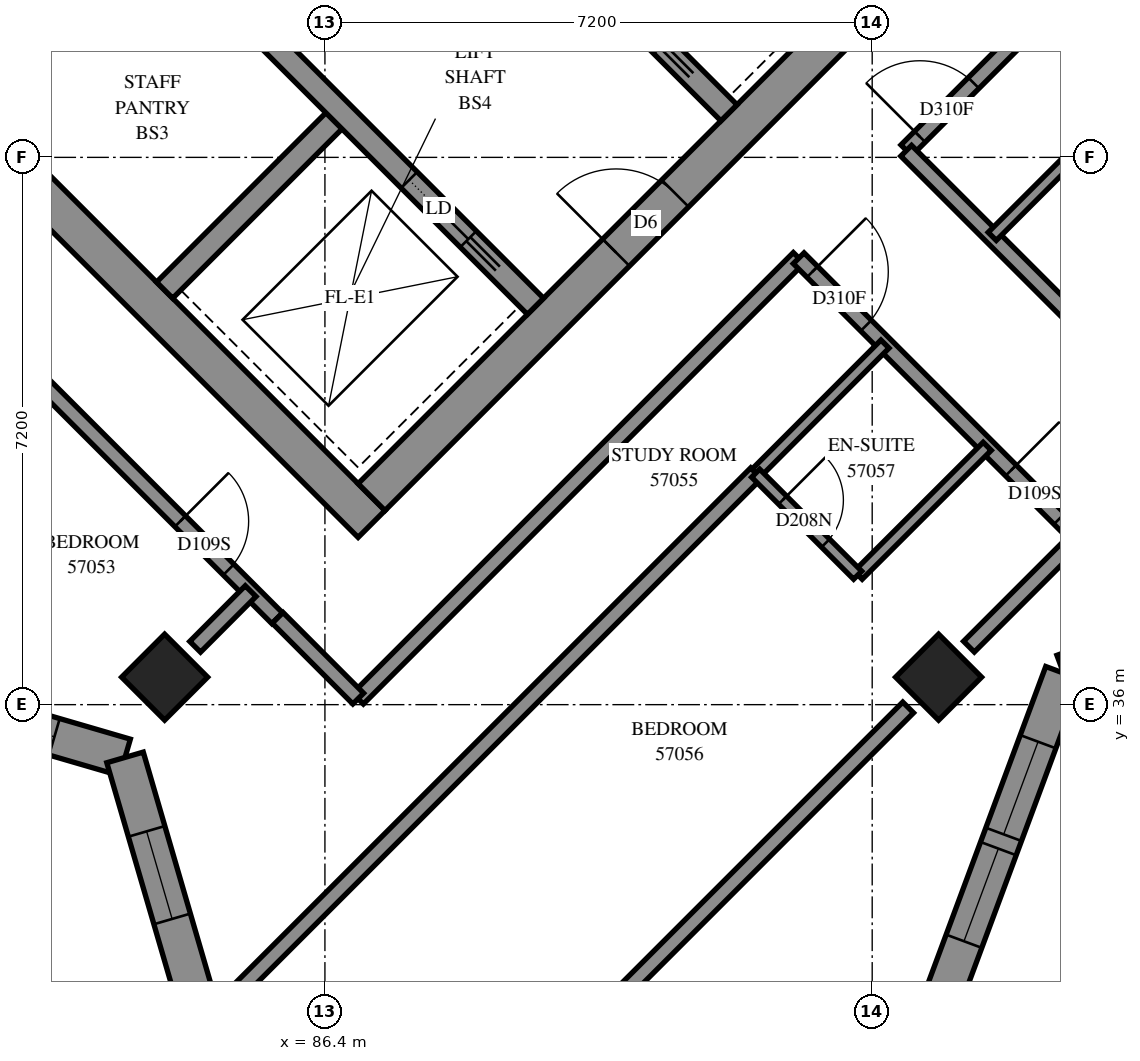
"""IFC4 building model, lengths in metres.
Left out: names, types, materials, properties, quantities, classifications, styles, units other than length and angle.
Written with IfcOpenShell. Run it as: python <this file> out.ifc"""

import sys

from ifc_helpers import new_model, si_unit, direction, frame, frame_2d, origin, origin_2d, place, context, subcontext, project, spatial, polyline, rectangle, outline, extrude, element, fill, save


model = new_model("IFC4")
c1 = context("Model", 3, precision=1e-05, world=origin(), true_north=direction((0.0, 1.0)))
c2 = subcontext(c1, "Body", "Model", "MODEL_VIEW")
j1 = project(units=[si_unit("LENGTHUNIT", "METRE"), si_unit("PLANEANGLEUNIT", "RADIAN")], contexts=[c1])
p1 = place(None, origin())
s1 = spatial("IfcSite", under=j1, at=p1, CompositionType="ELEMENT")
p2 = place(p1, origin())
s2 = spatial("IfcBuilding", under=s1, at=p2, CompositionType="ELEMENT")
p3 = place(p2, frame((0.0, 0.0, 210.0)))
s3 = spatial("IfcBuildingStorey", under=s2, at=p3, CompositionType="ELEMENT", Elevation=210.0)
for number, where, z_axis, x_axis in (
    (1, (84.291, 36.362, 0.0), (0.0, 0.0, 1.0), (0.707, -0.707, 0.0)),
    (2, (94.474, 36.362, 0.0), (0.0, 0.0, 1.0), (0.707, -0.707, 0.0)),
):
    element("IfcColumn", number, at=place(p3, frame(where, z_axis=z_axis, x_axis=x_axis)), inside=s3, PredefinedType="COLUMN", context=c2, shape_type="SweptSolid", body=[
        extrude(rectangle(XDim=0.8, YDim=0.8, at=origin_2d()), origin(), (0.0, 0.0, 1.0), 3.1),
    ])
p4 = place(p3, frame((76.124, 49.267, -0.3), z_axis=(0.0, 0.0, 1.0), x_axis=(0.7071067812, -0.7071067812, 0.0)))
e3 = element("IfcWall", 3, at=p4, inside=s3, PredefinedType="SHEAR", context=c2, shape_type="SweptSolid", body=[
    extrude(rectangle(XDim=15.4, YDim=0.5, at=frame_2d((7.7, 0.0))), origin(), (0.0, 0.0, 1.0), 2.7),
])
p5 = place(p3, frame((87.013, 38.731, -0.3), z_axis=(0.0, 0.0, 1.0), x_axis=(0.7071067812, 0.7071067812, 0.0)))
e4 = element("IfcWall", 4, at=p5, inside=s3, PredefinedType="SHEAR", context=c2, shape_type="SweptSolid", body=[
    extrude(rectangle(XDim=14.4, YDim=0.5, at=frame_2d((7.2, 0.0))), origin(), (0.0, 0.0, 1.0), 2.7),
])
p6 = place(p5, frame((4.55, 0.0, 0.3)))
e5 = element("IfcOpeningElement", 5, at=p6, cuts=e4, PredefinedType="OPENING", context=c2, shape_type="SweptSolid", body=[
    extrude(rectangle(XDim=1.1, YDim=2.1, at=frame_2d((0.55, 1.05))), frame((0.0, 0.26, 0.0), z_axis=(0.0, -1.0, 0.0), x_axis=(1.0, 0.0, 0.0)), (0.0, 0.0, 1.0), 0.52),
])
p7 = place(p5, frame((11.35, 0.0, 0.3)))
e6 = element("IfcOpeningElement", 6, at=p7, cuts=e4, PredefinedType="OPENING", context=c2, shape_type="SweptSolid", body=[
    extrude(rectangle(XDim=1.1, YDim=2.1, at=frame_2d((0.55, 1.05))), frame((0.0, 0.26, 0.0), z_axis=(0.0, -1.0, 0.0), x_axis=(1.0, 0.0, 0.0)), (0.0, 0.0, 1.0), 0.52),
])
for number, where, z_axis, x_axis in (
    (7, (81.746, 43.999, 0.0), (0.0, 0.0, 1.0), (0.707, 0.707, 0.0)),
    (8, (84.291, 41.453, 0.0), (0.0, 0.0, 1.0), (0.707, 0.707, 0.0)),
):
    element("IfcWall", number, at=place(p3, frame(where, z_axis=z_axis, x_axis=x_axis)), inside=s3, PredefinedType="SOLIDWALL", context=c2, shape_type="SweptSolid", body=[
        extrude(rectangle(XDim=3.3, YDim=0.3, at=frame_2d((1.65, 0.0))), origin(), (0.0, 0.0, 1.0), 3.1),
    ])
p8 = place(p3, frame((78.988, 51.423, 0.0), z_axis=(0.0, 0.0, 1.0), x_axis=(0.7071067812, -0.7071067812, 0.0)))
e9 = element("IfcWall", 9, at=p8, inside=s3, PredefinedType="SOLIDWALL", context=c2, shape_type="SweptSolid", body=[
    extrude(rectangle(XDim=14.4, YDim=0.3, at=frame_2d((7.2, 0.0))), origin(), (0.0, 0.0, 1.0), 3.1),
])
p9 = place(p8, frame((1.35, 0.0, 0.0)))
e10 = element("IfcOpeningElement", 10, at=p9, cuts=e9, PredefinedType="OPENING", context=c2, shape_type="SweptSolid", body=[
    extrude(rectangle(XDim=0.9, YDim=2.1, at=frame_2d((0.45, 1.05))), frame((0.0, 0.16, 0.0), z_axis=(0.0, -1.0, 0.0), x_axis=(1.0, 0.0, 0.0)), (0.0, 0.0, 1.0), 0.32),
])
p10 = place(p8, frame((4.95, 0.0, 0.0)))
e11 = element("IfcOpeningElement", 11, at=p10, cuts=e9, PredefinedType="OPENING", context=c2, shape_type="SweptSolid", body=[
    extrude(rectangle(XDim=0.9, YDim=2.1, at=frame_2d((0.45, 1.05))), frame((0.0, 0.16, 0.0), z_axis=(0.0, -1.0, 0.0), x_axis=(1.0, 0.0, 0.0)), (0.0, 0.0, 1.0), 0.32),
])
p11 = place(p8, frame((8.55, 0.0, 0.0)))
e12 = element("IfcOpeningElement", 12, at=p11, cuts=e9, PredefinedType="OPENING", context=c2, shape_type="SweptSolid", body=[
    extrude(rectangle(XDim=0.9, YDim=2.1, at=frame_2d((0.45, 1.05))), frame((0.0, 0.16, 0.0), z_axis=(0.0, -1.0, 0.0), x_axis=(1.0, 0.0, 0.0)), (0.0, 0.0, 1.0), 0.32),
])
p12 = place(p8, frame((12.05, 0.0, 0.0)))
e13 = element("IfcOpeningElement", 13, at=p12, cuts=e9, PredefinedType="OPENING", context=c2, shape_type="SweptSolid", body=[
    extrude(rectangle(XDim=1.1, YDim=2.1, at=frame_2d((0.55, 1.05))), frame((0.0, 0.16, 0.0), z_axis=(0.0, -1.0, 0.0), x_axis=(1.0, 0.0, 0.0)), (0.0, 0.0, 1.0), 0.32),
])
p13 = place(p3, frame((81.534, 53.969, 0.0), z_axis=(0.0, 0.0, 1.0), x_axis=(0.707103309, -0.7071102534, 0.0)))
e14 = element("IfcWall", 14, at=p13, inside=s3, PredefinedType="SOLIDWALL", context=c2, shape_type="SweptSolid", body=[
    extrude(rectangle(XDim=14.4, YDim=0.3, at=frame_2d((7.2, 0.0))), origin(), (0.0, 0.0, 1.0), 3.1),
])
p14 = place(p13, frame((1.25, 0.0, 0.0)))
e15 = element("IfcOpeningElement", 15, at=p14, cuts=e14, PredefinedType="OPENING", context=c2, shape_type="SweptSolid", body=[
    extrude(rectangle(XDim=1.1, YDim=2.1, at=frame_2d((0.55, 1.05))), frame((0.0, 0.16, 0.0), z_axis=(0.0, -1.0, 0.0), x_axis=(1.0, 0.0, 0.0)), (0.0, 0.0, 1.0), 0.32),
])
p15 = place(p13, frame((4.85, 0.0, 0.0)))
e16 = element("IfcOpeningElement", 16, at=p15, cuts=e14, PredefinedType="OPENING", context=c2, shape_type="SweptSolid", body=[
    extrude(rectangle(XDim=1.1, YDim=2.1, at=frame_2d((0.55, 1.05))), frame((0.0, 0.16, 0.0), z_axis=(0.0, -1.0, 0.0), x_axis=(1.0, 0.0, 0.0)), (0.0, 0.0, 1.0), 0.32),
])
p16 = place(p13, frame((8.45, 0.0, 0.0)))
e17 = element("IfcOpeningElement", 17, at=p16, cuts=e14, PredefinedType="OPENING", context=c2, shape_type="SweptSolid", body=[
    extrude(rectangle(XDim=1.1, YDim=2.1, at=frame_2d((0.55, 1.05))), frame((0.0, 0.16, 0.0), z_axis=(0.0, -1.0, 0.0), x_axis=(1.0, 0.0, 0.0)), (0.0, 0.0, 1.0), 0.32),
])
p17 = place(p13, frame((12.05, 0.0, 0.0)))
e18 = element("IfcOpeningElement", 18, at=p17, cuts=e14, PredefinedType="OPENING", context=c2, shape_type="SweptSolid", body=[
    extrude(rectangle(XDim=1.1, YDim=2.1, at=frame_2d((0.55, 1.05))), frame((0.0, 0.16, 0.0), z_axis=(0.0, -1.0, 0.0), x_axis=(1.0, 0.0, 0.0)), (0.0, 0.0, 1.0), 0.32),
])
p18 = place(p3, frame((94.281, 31.47, 0.0), z_axis=(0.0, 0.0, 1.0), x_axis=(0.3481903374, 0.9374238577, 0.0)))
e19 = element("IfcWall", 19, at=p18, inside=s3, PredefinedType="SOLIDWALL", context=c2, shape_type="SweptSolid", body=[
    extrude(outline(polyline([(-0.12, -0.25), (5.16, -0.25), (5.39, 0.25), (0.12, 0.25), (-0.12, -0.25)])), origin(), (0.0, 0.0, 1.0), 3.1),
])
p19 = place(p18, frame((1.512, 0.0, 0.45)))
e20 = element("IfcOpeningElement", 20, at=p19, cuts=e19, PredefinedType="OPENING", context=c2, shape_type="SweptSolid", body=[
    extrude(rectangle(XDim=1.3, YDim=2.5, at=frame_2d((0.65, 1.25))), frame((0.0, 0.26, 0.0), z_axis=(0.0, -1.0, 0.0), x_axis=(1.0, 0.0, 0.0)), (0.0, 0.0, 1.0), 0.52),
])
p20 = place(p18, frame((3.012, 0.0, 0.45)))
e21 = element("IfcOpeningElement", 21, at=p20, cuts=e19, PredefinedType="OPENING", context=c2, shape_type="SweptSolid", body=[
    extrude(rectangle(XDim=1.3, YDim=2.5, at=frame_2d((0.65, 1.25))), frame((0.0, 0.26, 0.0), z_axis=(0.0, -1.0, 0.0), x_axis=(1.0, 0.0, 0.0)), (0.0, 0.0, 1.0), 0.52),
])
p21 = place(p3, frame((96.118, 36.415, 0.0), z_axis=(0.0, 0.0, 1.0), x_axis=(0.9374238577, 0.3481903374, 0.0)))
e22 = element("IfcWall", 22, at=p21, inside=s3, PredefinedType="SOLIDWALL", context=c2, shape_type="SweptSolid", body=[
    extrude(outline(polyline([(0.115, -0.25), (5.395, -0.25), (5.155, 0.25), (-0.115, 0.25), (0.115, -0.25)])), origin(), (0.0, 0.0, 1.0), 3.1),
])
p22 = place(p21, frame((1.655, 0.0, 0.45)))
e23 = element("IfcOpeningElement", 23, at=p22, cuts=e22, PredefinedType="OPENING", context=c2, shape_type="SweptSolid", body=[
    extrude(rectangle(XDim=1.3, YDim=2.5, at=frame_2d((0.65, 1.25))), frame((0.0, 0.26, 0.0), z_axis=(0.0, -1.0, 0.0), x_axis=(1.0, 0.0, 0.0)), (0.0, 0.0, 1.0), 0.52),
])
p23 = place(p21, frame((3.155, 0.0, 0.45)))
e24 = element("IfcOpeningElement", 24, at=p23, cuts=e22, PredefinedType="OPENING", context=c2, shape_type="SweptSolid", body=[
    extrude(rectangle(XDim=1.3, YDim=2.5, at=frame_2d((0.65, 1.25))), frame((0.0, 0.26, 0.0), z_axis=(0.0, -1.0, 0.0), x_axis=(1.0, 0.0, 0.0)), (0.0, 0.0, 1.0), 0.52),
])
p24 = place(p3, frame((79.385, 36.585, 0.0), z_axis=(0.0, 0.0, 1.0), x_axis=(0.960028924, -0.2799008129, 0.0)))
e25 = element("IfcWall", 25, at=p24, inside=s3, PredefinedType="SOLIDWALL", context=c2, shape_type="SweptSolid", body=[
    extrude(outline(polyline([(-0.143, -0.25), (4.431, -0.25), (4.706, 0.25), (0.143, 0.25), (-0.143, -0.25)])), origin(), (0.0, 0.0, 1.0), 3.1),
])
p25 = place(p24, frame((0.55, 0.0, 0.45)))
e26 = element("IfcOpeningElement", 26, at=p25, cuts=e25, PredefinedType="OPENING", context=c2, shape_type="SweptSolid", body=[
    extrude(rectangle(XDim=1.3, YDim=2.5, at=frame_2d((0.65, 1.25))), frame((0.0, 0.26, 0.0), z_axis=(0.0, -1.0, 0.0), x_axis=(1.0, 0.0, 0.0)), (0.0, 0.0, 1.0), 0.52),
])
p26 = place(p24, frame((2.3, 0.0, 0.45)))
e27 = element("IfcOpeningElement", 27, at=p26, cuts=e25, PredefinedType="OPENING", context=c2, shape_type="SweptSolid", body=[
    extrude(rectangle(XDim=1.3, YDim=2.5, at=frame_2d((0.65, 1.25))), frame((0.0, 0.26, 0.0), z_axis=(0.0, -1.0, 0.0), x_axis=(1.0, 0.0, 0.0)), (0.0, 0.0, 1.0), 0.52),
])
p27 = place(p3, frame((83.77, 35.306, 0.0), z_axis=(0.0, 0.0, 1.0), x_axis=(0.2799008129, -0.960028924, 0.0)))
e28 = element("IfcWall", 28, at=p27, inside=s3, PredefinedType="SOLIDWALL", context=c2, shape_type="SweptSolid", body=[
    extrude(outline(polyline([(0.137, -0.25), (4.712, -0.25), (4.425, 0.25), (-0.137, 0.25), (0.137, -0.25)])), origin(), (0.0, 0.0, 1.0), 3.1),
])
p28 = place(p27, frame((1.014, 0.0, 0.45)))
e29 = element("IfcOpeningElement", 29, at=p28, cuts=e28, PredefinedType="OPENING", context=c2, shape_type="SweptSolid", body=[
    extrude(rectangle(XDim=1.2, YDim=2.5, at=frame_2d((0.6, 1.25))), frame((0.0, 0.26, 0.0), z_axis=(0.0, -1.0, 0.0), x_axis=(1.0, 0.0, 0.0)), (0.0, 0.0, 1.0), 0.52),
])
p29 = place(p3, frame((85.002, 31.976, 0.0), z_axis=(0.0, 0.0, 1.0), x_axis=(0.7072267874, 0.7069867546, 0.0)))
e30 = element("IfcWall", 30, at=p29, inside=s3, PredefinedType="PARTITIONING", context=c2, shape_type="SweptSolid", body=[
    extrude(rectangle(XDim=9.999, YDim=0.2, at=frame_2d((4.999, 0.0))), origin(), (0.0, 0.0, 1.0), 3.1),
])
p30 = place(p3, frame((94.049, 43.293, 0.0), z_axis=(0.0, 0.0, 1.0), x_axis=(0.7071067812, 0.7071067812, 0.0)))
e31 = element("IfcWall", 31, at=p30, inside=s3, PredefinedType="PARTITIONING", context=c2, shape_type="SweptSolid", body=[
    extrude(rectangle(XDim=8.2, YDim=0.2, at=frame_2d((4.1, 0.0))), origin(), (0.0, 0.0, 1.0), 3.1),
])
p31 = place(p30, frame((0.252, 0.0, 0.0)))
e32 = element("IfcOpeningElement", 32, at=p31, cuts=e31, PredefinedType="OPENING", context=c2, shape_type="SweptSolid", body=[
    extrude(rectangle(XDim=1.0, YDim=2.1, at=frame_2d((0.5, 1.05))), frame((0.0, 0.11, 0.0), z_axis=(0.0, -1.0, 0.0), x_axis=(1.0, 0.0, 0.0)), (0.0, 0.0, 1.0), 0.22),
])
p32 = place(p3, frame((86.835, 36.079, 0.0), z_axis=(0.0, 0.0, 1.0), x_axis=(0.7071067812, 0.7071067812, 0.0)))
e33 = element("IfcWall", 33, at=p32, inside=s3, PredefinedType="PARTITIONING", context=c2, shape_type="SweptSolid", body=[
    extrude(rectangle(XDim=8.2, YDim=0.2, at=frame_2d((4.1, 0.0))), origin(), (0.0, 0.0, 1.0), 3.1),
])
p33 = place(p3, frame((80.849, 42.061, 0.0), z_axis=(0.0, 0.0, 1.0), x_axis=(0.7071067812, -0.7071067812, 0.0)))
e34 = element("IfcWall", 34, at=p33, inside=s3, PredefinedType="PARTITIONING", context=c2, shape_type="SweptSolid", body=[
    extrude(rectangle(XDim=6.964, YDim=0.2, at=frame_2d((3.482, 0.0))), origin(), (0.0, 0.0, 1.0), 3.1),
])
p34 = place(p33, frame((5.159, 0.0, 0.0)))
e35 = element("IfcOpeningElement", 35, at=p34, cuts=e34, PredefinedType="OPENING", context=c2, shape_type="SweptSolid", body=[
    extrude(rectangle(XDim=0.9, YDim=2.1, at=frame_2d((0.45, 1.05))), frame((0.0, 0.11, 0.0), z_axis=(0.0, -1.0, 0.0), x_axis=(1.0, 0.0, 0.0)), (0.0, 0.0, 1.0), 0.22),
])
p35 = place(p3, frame((89.781, 31.671, 0.0), z_axis=(0.0, 0.0, 1.0), x_axis=(0.7071067812, 0.7071067812, 0.0)))
e36 = element("IfcWall", 36, at=p35, inside=s3, PredefinedType="PARTITIONING", context=c2, shape_type="SweptSolid", body=[
    extrude(rectangle(XDim=6.07, YDim=0.2, at=frame_2d((3.035, 0.0))), origin(), (0.0, 0.0, 1.0), 2.6),
])
p36 = place(p3, frame((94.047, 43.287, 0.0), z_axis=(0.0, 0.0, 1.0), x_axis=(0.7071067812, -0.7071067812, 0.0)))
e37 = element("IfcWall", 37, at=p36, inside=s3, PredefinedType="PARTITIONING", context=c2, shape_type="SweptSolid", body=[
    extrude(rectangle(XDim=5.199, YDim=0.2, at=frame_2d((2.599, 0.0))), origin(), (0.0, 0.0, 1.0), 3.1),
])
p37 = place(p36, frame((3.898, 0.0, 0.0)))
e38 = element("IfcOpeningElement", 38, at=p37, cuts=e37, PredefinedType="OPENING", context=c2, shape_type="SweptSolid", body=[
    extrude(rectangle(XDim=0.9, YDim=2.1, at=frame_2d((0.45, 1.05))), frame((0.0, 0.11, 0.0), z_axis=(0.0, -1.0, 0.0), x_axis=(1.0, 0.0, 0.0)), (0.0, 0.0, 1.0), 0.22),
])
p38 = place(p3, frame((92.633, 41.873, 0.0), z_axis=(0.0, 0.0, 1.0), x_axis=(0.7071067812, -0.7071067812, 0.0)))
e39 = element("IfcWall", 39, at=p38, inside=s3, PredefinedType="PARTITIONING", context=c2, shape_type="SweptSolid", body=[
    extrude(rectangle(XDim=5.199, YDim=0.2, at=frame_2d((2.599, 0.0))), origin(), (0.0, 0.0, 1.0), 3.1),
])
p39 = place(p38, frame((0.253, 0.0, 0.0)))
e40 = element("IfcOpeningElement", 40, at=p39, cuts=e39, PredefinedType="OPENING", context=c2, shape_type="SweptSolid", body=[
    extrude(rectangle(XDim=1.0, YDim=2.1, at=frame_2d((0.5, 1.05))), frame((0.0, 0.11, 0.0), z_axis=(0.0, -1.0, 0.0), x_axis=(1.0, 0.0, 0.0)), (0.0, 0.0, 1.0), 0.22),
])
p40 = place(p38, frame((3.948, 0.0, 0.0)))
e41 = element("IfcOpeningElement", 41, at=p40, cuts=e39, PredefinedType="OPENING", context=c2, shape_type="SweptSolid", body=[
    extrude(rectangle(XDim=0.9, YDim=2.1, at=frame_2d((0.45, 1.05))), frame((0.0, 0.11, 0.0), z_axis=(0.0, -1.0, 0.0), x_axis=(1.0, 0.0, 0.0)), (0.0, 0.0, 1.0), 0.22),
])
p41 = place(p3, frame((95.179, 42.161, 0.0), z_axis=(0.0, 0.0, 1.0), x_axis=(0.7071067812, 0.7071067812, 0.0)))
e42 = element("IfcWall", 42, at=p41, inside=s3, PredefinedType="PARTITIONING", context=c2, shape_type="SweptSolid", body=[
    extrude(rectangle(XDim=2.401, YDim=0.15, at=frame_2d((1.201, 0.0))), origin(), (0.0, 0.0, 1.0), 3.1),
])
for number, where, z_axis, x_axis in (
    (43, (92.072, 39.046, 0.0), (0.0, 0.0, 1.0), (0.707, 0.708, 0.0)),
    (44, (93.415, 37.703, 0.0), (0.0, 0.0, 1.0), (0.708, 0.707, 0.0)),
):
    element("IfcWall", number, at=place(p3, frame(where, z_axis=z_axis, x_axis=x_axis)), inside=s3, PredefinedType="PARTITIONING", context=c2, shape_type="SweptSolid", body=[
        extrude(rectangle(XDim=2.4, YDim=0.15, at=frame_2d((1.2, 0.0))), origin(), (0.0, 0.0, 1.0), 3.1),
    ])
p42 = place(p3, frame((94.873, 36.763, 0.0), z_axis=(0.0, 0.0, 1.0), x_axis=(0.7071067812, 0.7071067812, 0.0)))
e45 = element("IfcWall", 45, at=p42, inside=s3, PredefinedType="PARTITIONING", context=c2, shape_type="SweptSolid", body=[
    extrude(rectangle(XDim=2.034, YDim=0.2, at=frame_2d((1.017, 0.0))), origin(), (0.0, 0.0, 1.0), 2.6),
])
p43 = place(p3, frame((92.067, 39.045, 0.0), z_axis=(0.0, 0.0, 1.0), x_axis=(0.7071067812, -0.7071067812, 0.0)))
e46 = element("IfcWall", 46, at=p43, inside=s3, PredefinedType="PARTITIONING", context=c2, shape_type="SweptSolid", body=[
    extrude(rectangle(XDim=1.898, YDim=0.15, at=frame_2d((0.949, 0.0))), origin(), (0.0, 0.0, 1.0), 3.1),
])
p44 = place(p43, frame((0.501, 0.0, 0.0)))
e47 = element("IfcOpeningElement", 47, at=p44, cuts=e46, PredefinedType="OPENING", context=c2, shape_type="SweptSolid", body=[
    extrude(rectangle(XDim=0.8, YDim=2.1, at=frame_2d((0.4, 1.05))), frame((0.0, 0.085, 0.0), z_axis=(0.0, -1.0, 0.0), x_axis=(1.0, 0.0, 0.0)), (0.0, 0.0, 1.0), 0.17),
])
p45 = place(p3, frame((85.778, 37.142, 0.0), z_axis=(0.0, 0.0, 1.0), x_axis=(0.7064400143, -0.70777292, 0.0)))
e48 = element("IfcWall", 48, at=p45, inside=s3, PredefinedType="PARTITIONING", context=c2, shape_type="SweptSolid", body=[
    extrude(rectangle(XDim=1.5, YDim=0.2, at=frame_2d((0.75, 0.0))), origin(), (0.0, 0.0, 1.0), 3.1),
])
p46 = place(p3, frame((84.693, 36.761, 0.0), z_axis=(0.0, 0.0, 1.0), x_axis=(0.7061388061, 0.708073433, 0.0)))
e49 = element("IfcWall", 49, at=p46, inside=s3, PredefinedType="PARTITIONING", context=c2, shape_type="SweptSolid", body=[
    extrude(rectangle(XDim=1.034, YDim=0.2, at=frame_2d((0.517, 0.0))), origin(), (0.0, 0.0, 1.0), 3.1),
])
p47 = place(p19, origin())
e50 = element("IfcWindow", 50, at=p47, inside=s3, PartitioningType="SINGLE_PANEL", PredefinedType="WINDOW", context=c2, shape_type="SweptSolid", body=[
    extrude(rectangle(XDim=1.3, YDim=2.5, at=frame_2d((0.65, 1.25))), frame((0.0, 0.18, 0.0), z_axis=(0.0, -1.0, 0.0), x_axis=(1.0, 0.0, 0.0)), (0.0, 0.0, 1.0), 0.06),
])
fill(e20, e50)
p48 = place(p20, origin())
e51 = element("IfcWindow", 51, at=p48, inside=s3, PartitioningType="SINGLE_PANEL", PredefinedType="WINDOW", context=c2, shape_type="SweptSolid", body=[
    extrude(rectangle(XDim=1.3, YDim=2.5, at=frame_2d((0.65, 1.25))), frame((0.0, 0.18, 0.0), z_axis=(0.0, -1.0, 0.0), x_axis=(1.0, 0.0, 0.0)), (0.0, 0.0, 1.0), 0.06),
])
fill(e21, e51)
p49 = place(p26, origin())
e52 = element("IfcWindow", 52, at=p49, inside=s3, PartitioningType="SINGLE_PANEL", PredefinedType="WINDOW", context=c2, shape_type="SweptSolid", body=[
    extrude(rectangle(XDim=1.3, YDim=2.5, at=frame_2d((0.65, 1.25))), frame((0.0, 0.18, 0.0), z_axis=(0.0, -1.0, 0.0), x_axis=(1.0, 0.0, 0.0)), (0.0, 0.0, 1.0), 0.06),
])
fill(e27, e52)
p50 = place(p28, origin())
e53 = element("IfcWindow", 53, at=p50, inside=s3, PartitioningType="SINGLE_PANEL", PredefinedType="WINDOW", context=c2, shape_type="SweptSolid", body=[
    extrude(rectangle(XDim=1.2, YDim=2.5, at=frame_2d((0.6, 1.25))), frame((0.0, 0.18, 0.0), z_axis=(0.0, -1.0, 0.0), x_axis=(1.0, 0.0, 0.0)), (0.0, 0.0, 1.0), 0.06),
])
fill(e29, e53)
p51 = place(p6, origin())
e54 = element("IfcDoor", 54, at=p51, inside=s3, OperationType="DOUBLE_DOOR_SINGLE_SWING", PredefinedType="DOOR", context=c2, shape_type="SweptSolid", body=[
    extrude(rectangle(XDim=1.1, YDim=2.1, at=frame_2d((0.55, 1.05))), frame((0.0, 0.025, 0.0), z_axis=(0.0, -1.0, 0.0), x_axis=(1.0, 0.0, 0.0)), (0.0, 0.0, 1.0), 0.05),
])
fill(e5, e54)
p52 = place(p12, origin())
e55 = element("IfcDoor", 55, at=p52, inside=s3, OperationType="SLIDING_TO_RIGHT", PredefinedType="DOOR", context=c2, shape_type="SweptSolid", body=[
    extrude(rectangle(XDim=1.1, YDim=2.1, at=frame_2d((0.55, 1.05))), frame((0.0, 0.025, 0.0), z_axis=(0.0, -1.0, 0.0), x_axis=(1.0, 0.0, 0.0)), (0.0, 0.0, 1.0), 0.05),
])
fill(e13, e55)
p53 = place(p31, origin())
e56 = element("IfcDoor", 56, at=p53, inside=s3, OperationType="SINGLE_SWING_RIGHT", PredefinedType="DOOR", context=c2, shape_type="SweptSolid", body=[
    extrude(rectangle(XDim=1.0, YDim=2.1, at=frame_2d((0.5, 1.05))), frame((0.0, 0.025, 0.0), z_axis=(0.0, -1.0, 0.0), x_axis=(1.0, 0.0, 0.0)), (0.0, 0.0, 1.0), 0.05),
])
fill(e32, e56)
p54 = place(p34, origin())
e57 = element("IfcDoor", 57, at=p54, inside=s3, OperationType="SINGLE_SWING_RIGHT", PredefinedType="DOOR", context=c2, shape_type="SweptSolid", body=[
    extrude(rectangle(XDim=0.9, YDim=2.1, at=frame_2d((0.45, 1.05))), frame((0.0, 0.025, 0.0), z_axis=(0.0, -1.0, 0.0), x_axis=(1.0, 0.0, 0.0)), (0.0, 0.0, 1.0), 0.05),
])
fill(e35, e57)
p55 = place(p39, origin())
e58 = element("IfcDoor", 58, at=p55, inside=s3, OperationType="SINGLE_SWING_RIGHT", PredefinedType="DOOR", context=c2, shape_type="SweptSolid", body=[
    extrude(rectangle(XDim=1.0, YDim=2.1, at=frame_2d((0.5, 1.05))), frame((0.0, 0.025, 0.0), z_axis=(0.0, -1.0, 0.0), x_axis=(1.0, 0.0, 0.0)), (0.0, 0.0, 1.0), 0.05),
])
fill(e40, e58)
p56 = place(p40, origin())
e59 = element("IfcDoor", 59, at=p56, inside=s3, OperationType="SINGLE_SWING_LEFT", PredefinedType="DOOR", context=c2, shape_type="SweptSolid", body=[
    extrude(rectangle(XDim=0.9, YDim=2.1, at=frame_2d((0.45, 1.05))), frame((0.0, 0.025, 0.0), z_axis=(0.0, -1.0, 0.0), x_axis=(1.0, 0.0, 0.0)), (0.0, 0.0, 1.0), 0.05),
])
fill(e41, e59)
p57 = place(p44, origin())
e60 = element("IfcDoor", 60, at=p57, inside=s3, OperationType="SINGLE_SWING_RIGHT", PredefinedType="DOOR", context=c2, shape_type="SweptSolid", body=[
    extrude(rectangle(XDim=0.8, YDim=2.1, at=frame_2d((0.4, 1.05))), frame((0.0, 0.025, 0.0), z_axis=(0.0, -1.0, 0.0), x_axis=(1.0, 0.0, 0.0)), (0.0, 0.0, 1.0), 0.05),
])
fill(e47, e60)
save(model, sys.argv[1])
